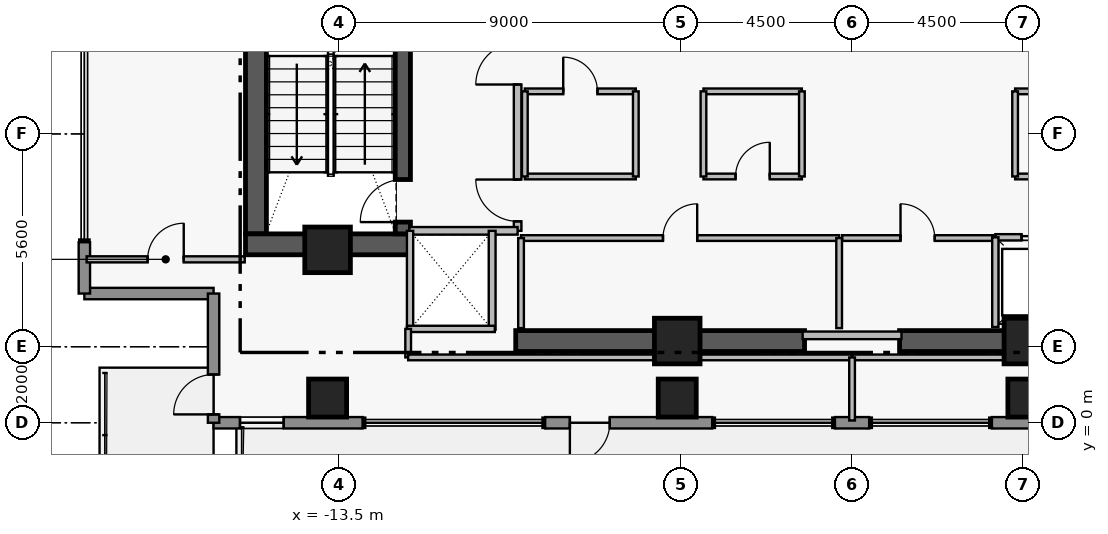
"""IFC4 building model, lengths in metres.
Left out: names, types, materials, properties, quantities, classifications, styles, units other than length and angle.
Written with IfcOpenShell. Run it as: python <this file> out.ifc"""

import sys

from ifc_helpers import new_model, si_unit, direction, frame, frame_2d, origin, origin_2d, place, context, subcontext, project, spatial, rectangle, extrude, element, fill, save


model = new_model("IFC4")
c1 = context("Model", 3, precision=1e-05, world=origin(), true_north=direction((0.0, 1.0)))
c2 = subcontext(c1, "Body", "Model", "MODEL_VIEW")
j1 = project(units=[si_unit("LENGTHUNIT", "METRE"), si_unit("PLANEANGLEUNIT", "RADIAN")], contexts=[c1])
p1 = place(None, origin())
s1 = spatial("IfcSite", under=j1, at=p1, CompositionType="ELEMENT")
p2 = place(p1, origin())
s2 = spatial("IfcBuilding", under=s1, at=p2, CompositionType="ELEMENT")
p3 = place(p2, frame((0.0, 0.0, 243.35)))
s3 = spatial("IfcBuildingStorey", under=s2, at=p3, CompositionType="ELEMENT", Elevation=243.35)
p4 = place(p3, frame((-15.685, 4.97, 0.0), z_axis=(0.0, 0.0, 1.0), x_axis=(0.0, 1.0, 0.0)))
e1 = element("IfcWall", 1, at=p4, inside=s3, PredefinedType="SHEAR", context=c2, shape_type="SweptSolid", body=[
    extrude(rectangle(XDim=8.96, YDim=0.55, at=frame_2d((4.48, 0.0))), origin(), (0.0, 0.0, 1.0), 3.51),
])
p5 = place(p3, frame((-15.96, 4.695, 0.0), z_axis=(0.0, 0.0, 1.0), x_axis=(1.0, 0.0, 0.0)))
e2 = element("IfcWall", 2, at=p5, inside=s3, PredefinedType="SHEAR", context=c2, shape_type="SweptSolid", body=[
    extrude(rectangle(XDim=4.36, YDim=0.55, at=frame_2d((2.18, 0.0))), origin(), (0.0, 0.0, 1.0), 3.51),
])
for number, where, z_axis, x_axis in (
    (3, (-8.85, 2.15, 0.0), (0.0, 0.0, 1.0), (1.0, 0.0, 0.0)),
    (4, (1.25, 2.15, 0.0), (0.0, 0.0, 1.0), (1.0, 0.0, 0.0)),
):
    element("IfcWall", number, at=place(p3, frame(where, z_axis=z_axis, x_axis=x_axis)), inside=s3, PredefinedType="SHEAR", context=c2, shape_type="SweptSolid", body=[
        extrude(rectangle(XDim=7.6, YDim=0.55, at=frame_2d((3.8, 0.0))), origin(), (0.0, 0.0, 1.0), 3.48),
    ])
p6 = place(p3, frame((-11.82, 4.97, 0.0), z_axis=(0.0, 0.0, 1.0), x_axis=(0.0, 1.0, 0.0)))
e5 = element("IfcWall", 5, at=p6, inside=s3, PredefinedType="SHEAR", context=c2, shape_type="SweptSolid", body=[
    extrude(rectangle(XDim=8.96, YDim=0.4, at=frame_2d((4.48, 0.0))), origin(), (0.0, 0.0, 1.0), 3.51),
])
p7 = place(p6, frame((0.31, 0.0, 0.0)))
e6 = element("IfcOpeningElement", 6, at=p7, cuts=e5, PredefinedType="OPENING", context=c2, shape_type="SweptSolid", body=[
    extrude(rectangle(XDim=1.12, YDim=2.22, at=frame_2d((0.56, 1.11))), frame((0.0, 0.21, 0.0), z_axis=(0.0, -1.0, 0.0), x_axis=(1.0, 0.0, 0.0)), (0.0, 0.0, 1.0), 0.42),
])
for number, where, z_axis, x_axis in (
    (7, (-13.8, 4.55, 0.0), (0.0, 0.0, 1.0), (1.0, 0.0, 0.0)),
    (8, (-4.6, 2.15, 0.0), (0.0, 0.0, 1.0), (1.0, 0.0, 0.0)),
    (9, (4.6, 2.15, 0.0), (0.0, 0.0, 1.0), (1.0, 0.0, 0.0)),
):
    element("IfcColumn", number, at=place(p3, frame(where, z_axis=z_axis, x_axis=x_axis)), inside=s3, PredefinedType="COLUMN", context=c2, shape_type="SweptSolid", body=[
        extrude(rectangle(XDim=1.2, YDim=1.2, at=origin_2d()), origin(), (0.0, 0.0, 1.0), 3.7),
    ])
for number, where, z_axis, x_axis in (
    (10, (-13.8, 0.65, 0.0), (0.0, 0.0, 1.0), (1.0, 0.0, 0.0)),
    (11, (-4.6, 0.65, 0.0), (0.0, 0.0, 1.0), (1.0, 0.0, 0.0)),
    (12, (4.6, 0.65, 0.0), (0.0, 0.0, 1.0), (1.0, 0.0, 0.0)),
):
    element("IfcColumn", number, at=place(p3, frame(where, z_axis=z_axis, x_axis=x_axis)), inside=s3, PredefinedType="COLUMN", context=c2, shape_type="SweptSolid", body=[
        extrude(rectangle(XDim=1.0, YDim=1.0, at=origin_2d()), origin(), (0.0, 0.0, 1.0), 3.7),
    ])
p8 = place(p3, frame((-16.8, 3.4, 0.0), z_axis=(0.0, 0.0, 1.0), x_axis=(-1.0, 0.0, 0.0)))
e13 = element("IfcWall", 13, at=p8, inside=s3, PredefinedType="STANDARD", context=c2, shape_type="SweptSolid", body=[
    extrude(rectangle(XDim=3.4, YDim=0.3, at=frame_2d((1.7, 0.0))), origin(), (0.0, 0.0, 1.0), 3.48),
])
p9 = place(p3, frame((-20.2, 3.4, 0.0), z_axis=(0.0, 0.0, 1.0), x_axis=(0.0, 1.0, 0.0)))
e14 = element("IfcWall", 14, at=p9, inside=s3, PredefinedType="STANDARD", context=c2, shape_type="SweptSolid", body=[
    extrude(rectangle(XDim=1.35, YDim=0.3, at=frame_2d((0.675, 0.0))), origin(), (0.0, 0.0, 1.0), 3.48),
])
p10 = place(p3, frame((5.52, 0.0, 0.0), z_axis=(0.0, 0.0, 1.0), x_axis=(-1.0, 0.0, 0.0)))
e15 = element("IfcWall", 15, at=p10, inside=s3, PredefinedType="STANDARD", context=c2, shape_type="SweptSolid", body=[
    extrude(rectangle(XDim=1.84, YDim=0.3, at=frame_2d((0.92, 0.0))), origin(), (0.0, 0.0, 1.0), 3.48),
])
p11 = place(p3, frame((0.45, 0.0, 0.0), z_axis=(0.0, 0.0, 1.0), x_axis=(-1.0, 0.0, 0.0)))
e16 = element("IfcWall", 16, at=p11, inside=s3, PredefinedType="STANDARD", context=c2, shape_type="SweptSolid", body=[
    extrude(rectangle(XDim=0.9, YDim=0.3, at=frame_2d((0.45, 0.0))), origin(), (0.0, 0.0, 1.0), 3.48),
])
p12 = place(p3, frame((-3.68, 0.0, 0.0), z_axis=(0.0, 0.0, 1.0), x_axis=(-1.0, 0.0, 0.0)))
e17 = element("IfcWall", 17, at=p12, inside=s3, PredefinedType="STANDARD", context=c2, shape_type="SweptSolid", body=[
    extrude(rectangle(XDim=4.395, YDim=0.3, at=frame_2d((2.198, 0.0))), origin(), (0.0, 0.0, 1.0), 3.48),
])
p13 = place(p12, frame((2.695, 0.0, 0.0)))
e18 = element("IfcOpeningElement", 18, at=p13, cuts=e17, PredefinedType="OPENING", context=c2, shape_type="SweptSolid", body=[
    extrude(rectangle(XDim=1.05, YDim=2.2, at=frame_2d((0.525, 1.1))), frame((0.0, 0.16, 0.0), z_axis=(0.0, -1.0, 0.0), x_axis=(1.0, 0.0, 0.0)), (0.0, 0.0, 1.0), 0.32),
])
p14 = place(p3, frame((-12.88, 0.0, 0.0), z_axis=(0.0, 0.0, 1.0), x_axis=(-1.0, 0.0, 0.0)))
e19 = element("IfcWall", 19, at=p14, inside=s3, PredefinedType="STANDARD", context=c2, shape_type="SweptSolid", body=[
    extrude(rectangle(XDim=3.92, YDim=0.3, at=frame_2d((1.96, 0.0))), origin(), (0.0, 0.0, 1.0), 3.48),
])
p15 = place(p14, frame((2.075, 0.0, 0.95)))
e20 = element("IfcOpeningElement", 20, at=p15, cuts=e19, PredefinedType="OPENING", context=c2, shape_type="SweptSolid", body=[
    extrude(rectangle(XDim=1.15, YDim=1.55, at=frame_2d((0.575, 0.775))), frame((0.0, 0.16, 0.0), z_axis=(0.0, -1.0, 0.0), x_axis=(1.0, 0.0, 0.0)), (0.0, 0.0, 1.0), 0.32),
])
p16 = place(p3, frame((-16.8, 0.0, 0.0), z_axis=(0.0, 0.0, 1.0), x_axis=(0.0, 1.0, 0.0)))
e21 = element("IfcWall", 21, at=p16, inside=s3, PredefinedType="STANDARD", context=c2, shape_type="SweptSolid", body=[
    extrude(rectangle(XDim=3.4, YDim=0.3, at=frame_2d((1.7, 0.0))), origin(), (0.0, 0.0, 1.0), 3.48),
])
p17 = place(p16, frame((0.22, 0.0, 0.0)))
e22 = element("IfcOpeningElement", 22, at=p17, cuts=e21, PredefinedType="OPENING", context=c2, shape_type="SweptSolid", body=[
    extrude(rectangle(XDim=1.05, YDim=2.2, at=frame_2d((0.525, 1.1))), frame((0.0, 0.16, 0.0), z_axis=(0.0, -1.0, 0.0), x_axis=(1.0, 0.0, 0.0)), (0.0, 0.0, 1.0), 0.32),
])
p18 = place(p3, frame((-8.8, 5.05, 0.0), z_axis=(0.0, 0.0, 1.0), x_axis=(0.0, 1.0, 0.0)))
e23 = element("IfcWall", 23, at=p18, inside=s3, PredefinedType="PARTITIONING", context=c2, shape_type="SweptSolid", body=[
    extrude(rectangle(XDim=6.1, YDim=0.2, at=frame_2d((3.05, 0.0))), origin(), (0.0, 0.0, 1.0), 3.48),
])
p19 = place(p18, frame((0.25, 0.0, 0.0)))
e24 = element("IfcOpeningElement", 24, at=p19, cuts=e23, PredefinedType="OPENING", context=c2, shape_type="SweptSolid", body=[
    extrude(rectangle(XDim=1.1, YDim=2.2, at=frame_2d((0.55, 1.1))), frame((0.0, 0.11, 0.0), z_axis=(0.0, -1.0, 0.0), x_axis=(1.0, 0.0, 0.0)), (0.0, 0.0, 1.0), 0.22),
])
p20 = place(p18, frame((3.85, 0.0, 0.0)))
e25 = element("IfcOpeningElement", 25, at=p20, cuts=e23, PredefinedType="OPENING", context=c2, shape_type="SweptSolid", body=[
    extrude(rectangle(XDim=1.1, YDim=2.2, at=frame_2d((0.55, 1.1))), frame((0.0, 0.11, 0.0), z_axis=(0.0, -1.0, 0.0), x_axis=(1.0, 0.0, 0.0)), (0.0, 0.0, 1.0), 0.22),
])
p21 = place(p3, frame((3.77, 4.88, 0.0), z_axis=(0.0, 0.0, 1.0), x_axis=(1.0, 0.0, 0.0)))
e26 = element("IfcWall", 26, at=p21, inside=s3, PredefinedType="PARTITIONING", context=c2, shape_type="SweptSolid", body=[
    extrude(rectangle(XDim=2.48, YDim=0.165, at=frame_2d((1.24, 0.0))), origin(), (0.0, 0.0, 1.0), 3.48),
])
p22 = place(p21, frame((0.69, 0.0, 0.0)))
e27 = element("IfcOpeningElement", 27, at=p22, cuts=e26, PredefinedType="OPENING", context=c2, shape_type="SweptSolid", body=[
    extrude(rectangle(XDim=1.1, YDim=2.25, at=frame_2d((0.55, 1.125))), frame((0.0, 0.093, 0.0), z_axis=(0.0, -1.0, 0.0), x_axis=(1.0, 0.0, 0.0)), (0.0, 0.0, 1.0), 0.185),
])
p23 = place(p3, frame((-8.71, 4.86, 0.0), z_axis=(0.0, 0.0, 1.0), x_axis=(1.0, 0.0, 0.0)))
e28 = element("IfcWall", 28, at=p23, inside=s3, PredefinedType="PARTITIONING", context=c2, shape_type="SweptSolid", body=[
    extrude(rectangle(XDim=8.37, YDim=0.15, at=frame_2d((4.185, 0.0))), origin(), (0.0, 0.0, 1.0), 3.48),
])
p24 = place(p23, frame((3.735, 0.0, 0.0)))
e29 = element("IfcOpeningElement", 29, at=p24, cuts=e28, PredefinedType="OPENING", context=c2, shape_type="SweptSolid", body=[
    extrude(rectangle(XDim=0.9, YDim=2.15, at=frame_2d((0.45, 1.075))), frame((0.0, 0.085, 0.0), z_axis=(0.0, -1.0, 0.0), x_axis=(1.0, 0.0, 0.0)), (0.0, 0.0, 1.0), 0.17),
])
p25 = place(p3, frame((-0.26, 4.86, 0.0), z_axis=(0.0, 0.0, 1.0), x_axis=(1.0, 0.0, 0.0)))
e30 = element("IfcWall", 30, at=p25, inside=s3, PredefinedType="PARTITIONING", context=c2, shape_type="SweptSolid", body=[
    extrude(rectangle(XDim=3.97, YDim=0.15, at=frame_2d((1.985, 0.0))), origin(), (0.0, 0.0, 1.0), 3.48),
])
p26 = place(p25, frame((1.535, 0.0, 0.0)))
e31 = element("IfcOpeningElement", 31, at=p26, cuts=e30, PredefinedType="OPENING", context=c2, shape_type="SweptSolid", body=[
    extrude(rectangle(XDim=0.9, YDim=2.15, at=frame_2d((0.45, 1.075))), frame((0.0, 0.085, 0.0), z_axis=(0.0, -1.0, 0.0), x_axis=(1.0, 0.0, 0.0)), (0.0, 0.0, 1.0), 0.17),
])
p27 = place(p3, frame((-8.61, 8.72, 0.0), z_axis=(0.0, 0.0, 1.0), x_axis=(1.0, 0.0, 0.0)))
e32 = element("IfcWall", 32, at=p27, inside=s3, PredefinedType="PARTITIONING", context=c2, shape_type="SweptSolid", body=[
    extrude(rectangle(XDim=2.92, YDim=0.15, at=frame_2d((1.46, 0.0))), origin(), (0.0, 0.0, 1.0), 3.48),
])
p28 = place(p27, frame((1.01, 0.0, 0.0)))
e33 = element("IfcOpeningElement", 33, at=p28, cuts=e32, PredefinedType="OPENING", context=c2, shape_type="SweptSolid", body=[
    extrude(rectangle(XDim=0.9, YDim=2.15, at=frame_2d((0.45, 1.075))), frame((0.0, 0.085, 0.0), z_axis=(0.0, -1.0, 0.0), x_axis=(1.0, 0.0, 0.0)), (0.0, 0.0, 1.0), 0.17),
])
p29 = place(p3, frame((-3.91, 6.48, 0.0), z_axis=(0.0, 0.0, 1.0), x_axis=(1.0, 0.0, 0.0)))
e34 = element("IfcWall", 34, at=p29, inside=s3, PredefinedType="PARTITIONING", context=c2, shape_type="SweptSolid", body=[
    extrude(rectangle(XDim=2.59, YDim=0.15, at=frame_2d((1.295, 0.0))), origin(), (0.0, 0.0, 1.0), 3.48),
])
p30 = place(p29, frame((0.845, 0.0, 0.0)))
e35 = element("IfcOpeningElement", 35, at=p30, cuts=e34, PredefinedType="OPENING", context=c2, shape_type="SweptSolid", body=[
    extrude(rectangle(XDim=0.9, YDim=2.15, at=frame_2d((0.45, 1.075))), frame((0.0, 0.085, 0.0), z_axis=(0.0, -1.0, 0.0), x_axis=(1.0, 0.0, 0.0)), (0.0, 0.0, 1.0), 0.17),
])
p31 = place(p3, frame((4.29, 6.48, 0.0), z_axis=(0.0, 0.0, 1.0), x_axis=(1.0, 0.0, 0.0)))
e36 = element("IfcWall", 36, at=p31, inside=s3, PredefinedType="PARTITIONING", context=c2, shape_type="SweptSolid", body=[
    extrude(rectangle(XDim=4.32, YDim=0.15, at=frame_2d((2.16, 0.0))), origin(), (0.0, 0.0, 1.0), 3.48),
])
p32 = place(p31, frame((1.71, 0.0, 0.0)))
e37 = element("IfcOpeningElement", 37, at=p32, cuts=e36, PredefinedType="OPENING", context=c2, shape_type="SweptSolid", body=[
    extrude(rectangle(XDim=0.9, YDim=2.15, at=frame_2d((0.45, 1.075))), frame((0.0, 0.085, 0.0), z_axis=(0.0, -1.0, 0.0), x_axis=(1.0, 0.0, 0.0)), (0.0, 0.0, 1.0), 0.17),
])
p33 = place(p3, frame((-20.14, 4.3, 0.0), z_axis=(0.0, 0.0, 1.0), x_axis=(1.0, 0.0, 0.0)))
e38 = element("IfcWall", 38, at=p33, inside=s3, PredefinedType="PARTITIONING", context=c2, shape_type="SweptSolid", body=[
    extrude(rectangle(XDim=4.16, YDim=0.16, at=frame_2d((2.08, 0.0))), origin(), (0.0, 0.0, 1.0), 3.48),
])
p34 = place(p33, frame((1.605, 0.0, 0.0)))
e39 = element("IfcOpeningElement", 39, at=p34, cuts=e38, PredefinedType="OPENING", context=c2, shape_type="SweptSolid", body=[
    extrude(rectangle(XDim=0.95, YDim=2.15, at=frame_2d((0.475, 1.075))), frame((0.0, 0.09, 0.0), z_axis=(0.0, -1.0, 0.0), x_axis=(1.0, 0.0, 0.0)), (0.0, 0.0, 1.0), 0.18),
])
p35 = place(p3, frame((-11.65, 5.05, 0.0), z_axis=(0.0, 0.0, 1.0), x_axis=(1.0, 0.0, 0.0)))
e40 = element("IfcWall", 40, at=p35, inside=s3, PredefinedType="PARTITIONING", context=c2, shape_type="SweptSolid", body=[
    extrude(rectangle(XDim=2.85, YDim=0.2, at=frame_2d((1.425, 0.0))), origin(), (0.0, 0.0, 1.0), 3.48),
])
p36 = place(p3, frame((3.77, 2.52, 0.0), z_axis=(0.0, 0.0, 1.0), x_axis=(0.0, 1.0, 0.0)))
e41 = element("IfcWall", 41, at=p36, inside=s3, PredefinedType="PARTITIONING", context=c2, shape_type="SweptSolid", body=[
    extrude(rectangle(XDim=2.36, YDim=0.165, at=frame_2d((1.18, 0.0))), origin(), (0.0, 0.0, 1.0), 3.48),
])
p37 = place(p3, frame((-1.3, 2.3, 0.0), z_axis=(0.0, 0.0, 1.0), x_axis=(1.0, 0.0, 0.0)))
e42 = element("IfcWall", 42, at=p37, inside=s3, PredefinedType="PARTITIONING", context=c2, shape_type="SweptSolid", body=[
    extrude(rectangle(XDim=2.6, YDim=0.2, at=frame_2d((1.3, 0.0))), origin(), (0.0, 0.0, 1.0), 2.38),
])
for number, where, z_axis, x_axis in (
    (43, (-8.71, 2.49, 0.0), (0.0, 0.0, 1.0), (0.0, 1.0, 0.0)),
    (44, (-0.34, 2.49, 0.0), (0.0, 0.0, 1.0), (0.0, 1.0, 0.0)),
):
    element("IfcWall", number, at=place(p3, frame(where, z_axis=z_axis, x_axis=x_axis)), inside=s3, PredefinedType="PARTITIONING", context=c2, shape_type="SweptSolid", body=[
        extrude(rectangle(XDim=2.37, YDim=0.15, at=frame_2d((1.185, 0.0))), origin(), (0.0, 0.0, 1.0), 3.48),
    ])
p38 = place(p3, frame((-9.47, 2.45, 0.0), z_axis=(0.0, 0.0, 1.0), x_axis=(0.0, 1.0, 0.0)))
e45 = element("IfcWall", 45, at=p38, inside=s3, PredefinedType="PARTITIONING", context=c2, shape_type="SweptSolid", body=[
    extrude(rectangle(XDim=2.6, YDim=0.18, at=frame_2d((1.3, 0.0))), origin(), (0.0, 0.0, 1.0), 3.48),
])
p39 = place(p3, frame((-11.63, 2.47, 0.0), z_axis=(0.0, 0.0, 1.0), x_axis=(0.0, 1.0, 0.0)))
e46 = element("IfcWall", 46, at=p39, inside=s3, PredefinedType="PARTITIONING", context=c2, shape_type="SweptSolid", body=[
    extrude(rectangle(XDim=2.58, YDim=0.165, at=frame_2d((1.29, 0.0))), origin(), (0.0, 0.0, 1.0), 3.48),
])
p40 = place(p3, frame((-11.71, 2.47, 0.0), z_axis=(0.0, 0.0, 1.0), x_axis=(1.0, 0.0, 0.0)))
e47 = element("IfcWall", 47, at=p40, inside=s3, PredefinedType="PARTITIONING", context=c2, shape_type="SweptSolid", body=[
    extrude(rectangle(XDim=2.31, YDim=0.165, at=frame_2d((1.155, 0.0))), origin(), (0.0, 0.0, 1.0), 2.38),
])
p41 = place(p3, frame((-8.61, 6.48, 0.0), z_axis=(0.0, 0.0, 1.0), x_axis=(1.0, 0.0, 0.0)))
e48 = element("IfcWall", 48, at=p41, inside=s3, PredefinedType="PARTITIONING", context=c2, shape_type="SweptSolid", body=[
    extrude(rectangle(XDim=2.92, YDim=0.15, at=frame_2d((1.46, 0.0))), origin(), (0.0, 0.0, 1.0), 3.48),
])
for number, where, z_axis, x_axis in (
    (49, (-8.61, 6.48, 0.0), (0.0, 0.0, 1.0), (0.0, 1.0, 0.0)),
    (50, (-5.69, 6.48, 0.0), (0.0, 0.0, 1.0), (0.0, 1.0, 0.0)),
):
    element("IfcWall", number, at=place(p3, frame(where, z_axis=z_axis, x_axis=x_axis)), inside=s3, PredefinedType="PARTITIONING", context=c2, shape_type="SweptSolid", body=[
        extrude(rectangle(XDim=2.24, YDim=0.15, at=frame_2d((1.12, 0.0))), origin(), (0.0, 0.0, 1.0), 3.48),
    ])
p42 = place(p3, frame((-3.91, 8.72, 0.0), z_axis=(0.0, 0.0, 1.0), x_axis=(1.0, 0.0, 0.0)))
e51 = element("IfcWall", 51, at=p42, inside=s3, PredefinedType="PARTITIONING", context=c2, shape_type="SweptSolid", body=[
    extrude(rectangle(XDim=2.59, YDim=0.15, at=frame_2d((1.295, 0.0))), origin(), (0.0, 0.0, 1.0), 3.48),
])
for number, where, z_axis, x_axis in (
    (52, (-3.91, 6.48, 0.0), (0.0, 0.0, 1.0), (0.0, 1.0, 0.0)),
    (53, (-1.32, 6.48, 0.0), (0.0, 0.0, 1.0), (0.0, 1.0, 0.0)),
):
    element("IfcWall", number, at=place(p3, frame(where, z_axis=z_axis, x_axis=x_axis)), inside=s3, PredefinedType="PARTITIONING", context=c2, shape_type="SweptSolid", body=[
        extrude(rectangle(XDim=2.24, YDim=0.15, at=frame_2d((1.12, 0.0))), origin(), (0.0, 0.0, 1.0), 3.48),
    ])
p43 = place(p3, frame((4.29, 8.72, 0.0), z_axis=(0.0, 0.0, 1.0), x_axis=(1.0, 0.0, 0.0)))
e54 = element("IfcWall", 54, at=p43, inside=s3, PredefinedType="PARTITIONING", context=c2, shape_type="SweptSolid", body=[
    extrude(rectangle(XDim=4.32, YDim=0.15, at=frame_2d((2.16, 0.0))), origin(), (0.0, 0.0, 1.0), 3.48),
])
p44 = place(p3, frame((4.29, 6.48, 0.0), z_axis=(0.0, 0.0, 1.0), x_axis=(0.0, 1.0, 0.0)))
e55 = element("IfcWall", 55, at=p44, inside=s3, PredefinedType="PARTITIONING", context=c2, shape_type="SweptSolid", body=[
    extrude(rectangle(XDim=2.24, YDim=0.15, at=frame_2d((1.12, 0.0))), origin(), (0.0, 0.0, 1.0), 3.48),
])
p45 = place(p3, frame((-11.68, 1.72, 0.0), z_axis=(0.0, 0.0, 1.0), x_axis=(0.0, 1.0, 0.0)))
e56 = element("IfcWall", 56, at=p45, inside=s3, PredefinedType="PARTITIONING", context=c2, shape_type="SweptSolid", body=[
    extrude(rectangle(XDim=0.75, YDim=0.15, at=frame_2d((0.375, 0.0))), origin(), (0.0, 0.0, 1.0), 3.48),
])
for number, where, z_axis, x_axis in (
    (57, (-11.68, 1.72, 0.0), (0.0, 0.0, 1.0), (1.0, 0.0, 0.0)),
    (58, (0.0, 1.72, 0.0), (0.0, 0.0, 1.0), (1.0, 0.0, 0.0)),
):
    element("IfcWall", number, at=place(p3, frame(where, z_axis=z_axis, x_axis=x_axis)), inside=s3, PredefinedType="PARTITIONING", context=c2, shape_type="SweptSolid", body=[
        extrude(rectangle(XDim=11.68, YDim=0.15, at=frame_2d((5.84, 0.0))), origin(), (0.0, 0.0, 1.0), 2.38),
    ])
p46 = place(p3, frame((0.0, 0.06, 0.0), z_axis=(0.0, 0.0, 1.0), x_axis=(0.0, 1.0, 0.0)))
e59 = element("IfcWall", 59, at=p46, inside=s3, PredefinedType="PARTITIONING", context=c2, shape_type="SweptSolid", body=[
    extrude(rectangle(XDim=1.66, YDim=0.15, at=frame_2d((0.83, 0.0))), origin(), (0.0, 0.0, 1.0), 3.48),
])
p47 = place(p13, origin())
e60 = element("IfcDoor", 60, at=p47, inside=s3, OperationType="SINGLE_SWING_RIGHT", PredefinedType="DOOR", context=c2, shape_type="SweptSolid", body=[
    extrude(rectangle(XDim=1.05, YDim=2.2, at=frame_2d((0.525, 1.1))), frame((0.0, 0.025, 0.0), z_axis=(0.0, -1.0, 0.0), x_axis=(1.0, 0.0, 0.0)), (0.0, 0.0, 1.0), 0.05),
])
fill(e18, e60)
p48 = place(p15, origin())
e61 = element("IfcWindow", 61, at=p48, inside=s3, PartitioningType="SINGLE_PANEL", PredefinedType="WINDOW", context=c2, shape_type="SweptSolid", body=[
    extrude(rectangle(XDim=1.15, YDim=1.55, at=frame_2d((0.575, 0.775))), frame((0.0, 0.03, 0.0), z_axis=(0.0, -1.0, 0.0), x_axis=(1.0, 0.0, 0.0)), (0.0, 0.0, 1.0), 0.06),
])
fill(e20, e61)
p49 = place(p17, origin())
e62 = element("IfcDoor", 62, at=p49, inside=s3, OperationType="SINGLE_SWING_LEFT", PredefinedType="DOOR", context=c2, shape_type="SweptSolid", body=[
    extrude(rectangle(XDim=1.05, YDim=2.2, at=frame_2d((0.525, 1.1))), frame((0.0, 0.025, 0.0), z_axis=(0.0, -1.0, 0.0), x_axis=(1.0, 0.0, 0.0)), (0.0, 0.0, 1.0), 0.05),
])
fill(e22, e62)
p50 = place(p7, origin())
e63 = element("IfcDoor", 63, at=p50, inside=s3, OperationType="SINGLE_SWING_LEFT", PredefinedType="DOOR", context=c2, shape_type="SweptSolid", body=[
    extrude(rectangle(XDim=1.12, YDim=2.22, at=frame_2d((0.56, 1.11))), frame((0.0, 0.025, 0.0), z_axis=(0.0, -1.0, 0.0), x_axis=(1.0, 0.0, 0.0)), (0.0, 0.0, 1.0), 0.05),
])
fill(e6, e63)
p51 = place(p19, origin())
e64 = element("IfcDoor", 64, at=p51, inside=s3, OperationType="SINGLE_SWING_RIGHT", PredefinedType="DOOR", context=c2, shape_type="SweptSolid", body=[
    extrude(rectangle(XDim=1.1, YDim=2.2, at=frame_2d((0.55, 1.1))), frame((0.0, 0.025, 0.0), z_axis=(0.0, -1.0, 0.0), x_axis=(1.0, 0.0, 0.0)), (0.0, 0.0, 1.0), 0.05),
])
fill(e24, e64)
p52 = place(p20, origin())
e65 = element("IfcDoor", 65, at=p52, inside=s3, OperationType="SINGLE_SWING_LEFT", PredefinedType="DOOR", context=c2, shape_type="SweptSolid", body=[
    extrude(rectangle(XDim=1.1, YDim=2.2, at=frame_2d((0.55, 1.1))), frame((0.0, 0.025, 0.0), z_axis=(0.0, -1.0, 0.0), x_axis=(1.0, 0.0, 0.0)), (0.0, 0.0, 1.0), 0.05),
])
fill(e25, e65)
p53 = place(p22, origin())
e66 = element("IfcDoor", 66, at=p53, inside=s3, OperationType="SLIDING_TO_LEFT", PredefinedType="DOOR", context=c2, shape_type="SweptSolid", body=[
    extrude(rectangle(XDim=1.1, YDim=2.25, at=frame_2d((0.55, 1.125))), frame((0.0, 0.025, 0.0), z_axis=(0.0, -1.0, 0.0), x_axis=(1.0, 0.0, 0.0)), (0.0, 0.0, 1.0), 0.05),
])
fill(e27, e66)
p54 = place(p24, origin())
e67 = element("IfcDoor", 67, at=p54, inside=s3, OperationType="SINGLE_SWING_RIGHT", PredefinedType="DOOR", context=c2, shape_type="SweptSolid", body=[
    extrude(rectangle(XDim=0.9, YDim=2.15, at=frame_2d((0.45, 1.075))), frame((0.0, 0.025, 0.0), z_axis=(0.0, -1.0, 0.0), x_axis=(1.0, 0.0, 0.0)), (0.0, 0.0, 1.0), 0.05),
])
fill(e29, e67)
p55 = place(p26, origin())
e68 = element("IfcDoor", 68, at=p55, inside=s3, OperationType="SINGLE_SWING_LEFT", PredefinedType="DOOR", context=c2, shape_type="SweptSolid", body=[
    extrude(rectangle(XDim=0.9, YDim=2.15, at=frame_2d((0.45, 1.075))), frame((0.0, 0.025, 0.0), z_axis=(0.0, -1.0, 0.0), x_axis=(1.0, 0.0, 0.0)), (0.0, 0.0, 1.0), 0.05),
])
fill(e31, e68)
p56 = place(p28, origin())
e69 = element("IfcDoor", 69, at=p56, inside=s3, OperationType="SINGLE_SWING_LEFT", PredefinedType="DOOR", context=c2, shape_type="SweptSolid", body=[
    extrude(rectangle(XDim=0.9, YDim=2.15, at=frame_2d((0.45, 1.075))), frame((0.0, 0.025, 0.0), z_axis=(0.0, -1.0, 0.0), x_axis=(1.0, 0.0, 0.0)), (0.0, 0.0, 1.0), 0.05),
])
fill(e33, e69)
p57 = place(p30, origin())
e70 = element("IfcDoor", 70, at=p57, inside=s3, OperationType="SINGLE_SWING_RIGHT", PredefinedType="DOOR", context=c2, shape_type="SweptSolid", body=[
    extrude(rectangle(XDim=0.9, YDim=2.15, at=frame_2d((0.45, 1.075))), frame((0.0, 0.025, 0.0), z_axis=(0.0, -1.0, 0.0), x_axis=(1.0, 0.0, 0.0)), (0.0, 0.0, 1.0), 0.05),
])
fill(e35, e70)
p58 = place(p34, origin())
e71 = element("IfcDoor", 71, at=p58, inside=s3, OperationType="SINGLE_SWING_RIGHT", PredefinedType="DOOR", context=c2, shape_type="SweptSolid", body=[
    extrude(rectangle(XDim=0.95, YDim=2.15, at=frame_2d((0.475, 1.075))), frame((0.0, 0.025, 0.0), z_axis=(0.0, -1.0, 0.0), x_axis=(1.0, 0.0, 0.0)), (0.0, 0.0, 1.0), 0.05),
])
fill(e39, e71)
save(model, sys.argv[1])
